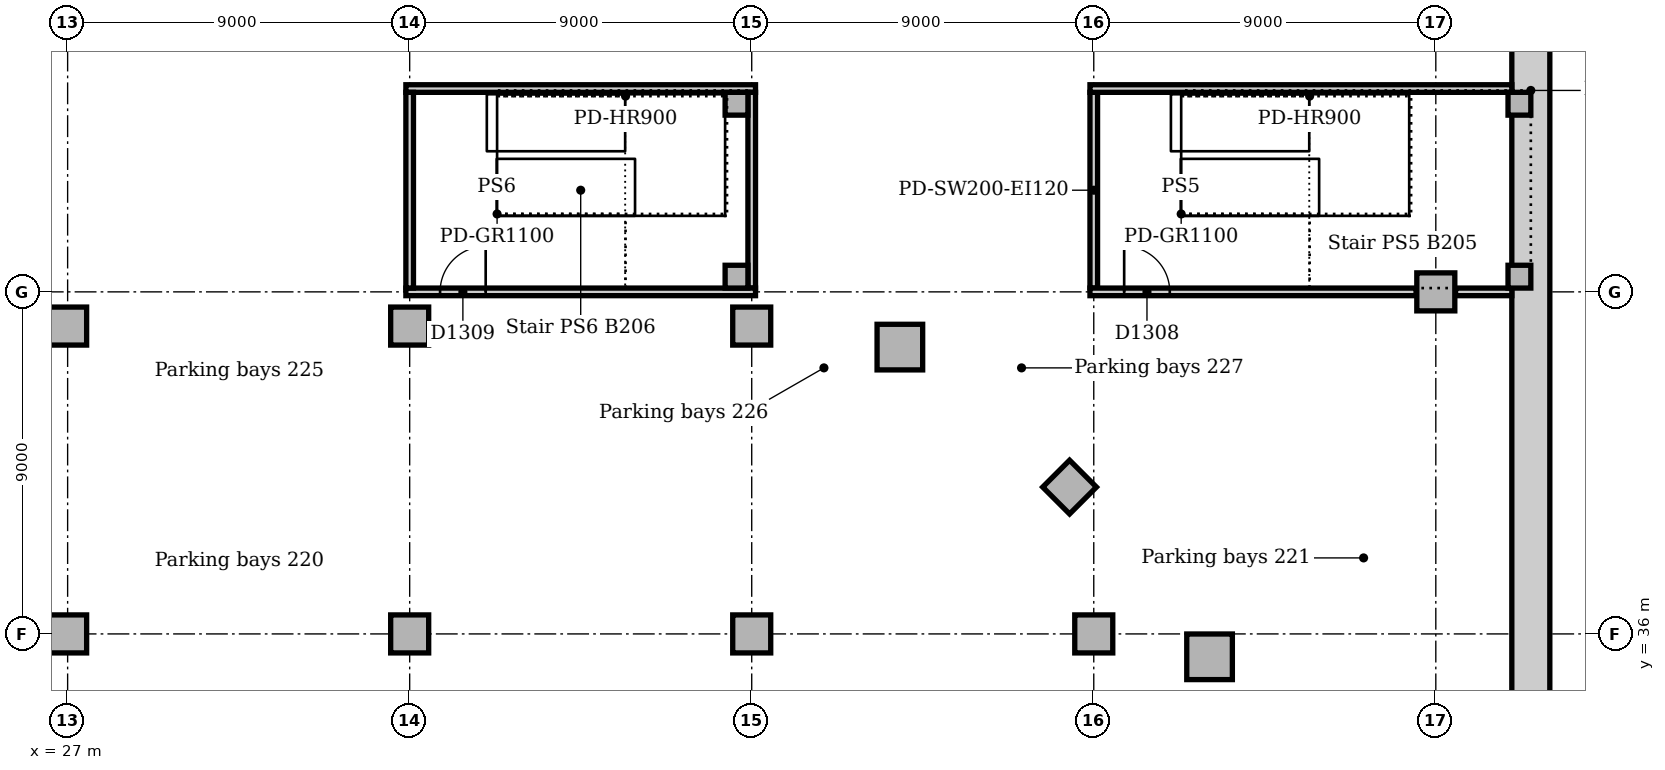
"""IFC4 building model, lengths in metres.
Left out: names, types, materials, properties, quantities, classifications, styles, units other than length and angle.
Written with IfcOpenShell. Run it as: python <this file> out.ifc"""

import sys

from ifc_helpers import new_model, si_unit, direction, frame, frame_2d, origin, origin_2d, place, context, subcontext, project, spatial, rectangle, extrude, element, fill, save


model = new_model("IFC4")
c1 = context("Model", 3, precision=1e-05, world=origin(), true_north=direction((0.0, 1.0)))
c2 = subcontext(c1, "Body", "Model", "MODEL_VIEW")
j1 = project(units=[si_unit("LENGTHUNIT", "METRE"), si_unit("PLANEANGLEUNIT", "RADIAN")], contexts=[c1])
p1 = place(None, origin())
s1 = spatial("IfcSite", under=j1, at=p1, CompositionType="ELEMENT")
p2 = place(p1, origin())
s2 = spatial("IfcBuilding", under=s1, at=p2, CompositionType="ELEMENT")
p3 = place(p2, frame((0.0, 0.0, -9.5)))
s3 = spatial("IfcBuildingStorey", under=s2, at=p3, CompositionType="ELEMENT", Elevation=-9.5)
for number, where, z_axis, x_axis in (
    (1, (57.047, 35.398, 0.0), (0.0, 0.0, 1.0), (1.0, 0.0, 0.0)),
    (2, (48.898, 43.547, 0.0), (0.0, 0.0, 1.0), (1.0, 0.0, 0.0)),
):
    element("IfcColumn", number, at=place(p3, frame(where, z_axis=z_axis, x_axis=x_axis)), inside=s3, PredefinedType="COLUMN", context=c2, shape_type="SweptSolid", body=[
        extrude(rectangle(XDim=1.2, YDim=1.2, at=origin_2d()), origin(), (0.0, 0.0, 1.0), 4.15),
    ])
for number, where, z_axis, x_axis in (
    (3, (53.364, 39.864, 0.0), (0.0, 0.0, 1.0), (0.707, 0.707, 0.0)),
    (4, (27.0, 44.1, 0.0), (0.0, 0.0, 1.0), (1.0, 0.0, 0.0)),
    (5, (36.0, 44.1, 0.0), (0.0, 0.0, 1.0), (1.0, 0.0, 0.0)),
    (6, (45.0, 44.1, 0.0), (0.0, 0.0, 1.0), (1.0, 0.0, 0.0)),
    (7, (27.0, 36.0, 0.0), (0.0, 0.0, 1.0), (1.0, 0.0, 0.0)),
    (8, (36.0, 36.0, 0.0), (0.0, 0.0, 1.0), (1.0, 0.0, 0.0)),
    (9, (45.0, 36.0, 0.0), (0.0, 0.0, 1.0), (1.0, 0.0, 0.0)),
    (10, (54.0, 36.0, 0.0), (0.0, 0.0, 1.0), (1.0, 0.0, 0.0)),
):
    element("IfcColumn", number, at=place(p3, frame(where, z_axis=z_axis, x_axis=x_axis)), inside=s3, PredefinedType="COLUMN", context=c2, shape_type="SweptSolid", body=[
        extrude(rectangle(XDim=1.0, YDim=1.0, at=origin_2d()), origin(), (0.0, 0.0, 1.0), 4.15),
    ])
p4 = place(p3, frame((65.5, 53.641, 0.0), z_axis=(0.0, 0.0, 1.0), x_axis=(0.0, -1.0, 0.0)))
e11 = element("IfcWall", 11, at=p4, inside=s3, PredefinedType="SOLIDWALL", context=c2, shape_type="SweptSolid", body=[
    extrude(rectangle(XDim=62.282, YDim=1.0, at=frame_2d((31.141, 0.0))), origin(), (0.0, 0.0, 1.0), 4.5),
])
p5 = place(p3, frame((63.0, 45.0, 0.0), z_axis=(0.0, 0.0, 1.0), x_axis=(1.0, 0.0, 0.0)))
e12 = element("IfcColumn", 12, at=p5, inside=s3, PredefinedType="COLUMN", context=c2, shape_type="SweptSolid", body=[
    extrude(rectangle(XDim=1.0, YDim=1.0, at=origin_2d()), origin(), (0.0, 0.0, 1.0), 4.15),
])
for number, where, z_axis, x_axis in (
    (13, (65.2, 49.95, 0.0), (0.0, 0.0, 1.0), (1.0, 0.0, 0.0)),
    (14, (65.2, 45.4, 0.0), (0.0, 0.0, 1.0), (1.0, 0.0, 0.0)),
    (15, (44.6, 49.95, 0.0), (0.0, 0.0, 1.0), (1.0, 0.0, 0.0)),
    (16, (44.6, 45.4, 0.0), (0.0, 0.0, 1.0), (1.0, 0.0, 0.0)),
):
    element("IfcColumn", number, at=place(p3, frame(where, z_axis=z_axis, x_axis=x_axis)), inside=s3, PredefinedType="COLUMN", context=c2, shape_type="SweptSolid", body=[
        extrude(rectangle(XDim=0.6, YDim=0.6, at=origin_2d()), origin(), (0.0, 0.0, 1.0), 4.5),
    ])
p6 = place(p3, frame((54.0, 45.1, 0.0), z_axis=(0.0, 0.0, 1.0), x_axis=(0.0, 1.0, 0.0)))
e17 = element("IfcWall", 17, at=p6, inside=s3, PredefinedType="SOLIDWALL", context=c2, shape_type="SweptSolid", body=[
    extrude(rectangle(XDim=5.15, YDim=0.2, at=frame_2d((2.575, 0.0))), origin(), (0.0, 0.0, 1.0), 4.15),
])
p7 = place(p3, frame((53.9, 50.35, 0.0), z_axis=(0.0, 0.0, 1.0), x_axis=(1.0, 0.0, 0.0)))
e18 = element("IfcWall", 18, at=p7, inside=s3, PredefinedType="SOLIDWALL", context=c2, shape_type="SweptSolid", body=[
    extrude(rectangle(XDim=11.1, YDim=0.2, at=frame_2d((5.55, 0.0))), origin(), (0.0, 0.0, 1.0), 4.15),
])
p8 = place(p3, frame((53.9, 45.0, 0.0), z_axis=(0.0, 0.0, 1.0), x_axis=(1.0, 0.0, 0.0)))
e19 = element("IfcWall", 19, at=p8, inside=s3, PredefinedType="SOLIDWALL", context=c2, shape_type="SweptSolid", body=[
    extrude(rectangle(XDim=8.58, YDim=0.2, at=frame_2d((4.29, 0.0))), origin(), (0.0, 0.0, 1.0), 4.15),
])
p9 = place(p8, frame((0.9, 0.0, 0.0)))
e20 = element("IfcOpeningElement", 20, at=p9, cuts=e19, PredefinedType="OPENING", context=c2, shape_type="SweptSolid", body=[
    extrude(rectangle(XDim=1.2, YDim=2.1, at=frame_2d((0.6, 1.05))), frame((0.0, 0.11, 0.0), z_axis=(0.0, -1.0, 0.0), x_axis=(1.0, 0.0, 0.0)), (0.0, 0.0, 1.0), 0.22),
])
p10 = place(p3, frame((63.52, 45.0, 0.0), z_axis=(0.0, 0.0, 1.0), x_axis=(1.0, 0.0, 0.0)))
e21 = element("IfcWall", 21, at=p10, inside=s3, PredefinedType="SOLIDWALL", context=c2, shape_type="SweptSolid", body=[
    extrude(rectangle(XDim=1.48, YDim=0.2, at=frame_2d((0.74, 0.0))), origin(), (0.0, 0.0, 1.0), 4.15),
])
p11 = place(p3, frame((35.9, 50.35, 0.0), z_axis=(0.0, 0.0, 1.0), x_axis=(1.0, 0.0, 0.0)))
e22 = element("IfcWall", 22, at=p11, inside=s3, PredefinedType="SOLIDWALL", context=c2, shape_type="SweptSolid", body=[
    extrude(rectangle(XDim=9.2, YDim=0.2, at=frame_2d((4.6, 0.0))), origin(), (0.0, 0.0, 1.0), 4.15),
])
p12 = place(p3, frame((45.0, 45.1, 0.0), z_axis=(0.0, 0.0, 1.0), x_axis=(0.0, 1.0, 0.0)))
e23 = element("IfcWall", 23, at=p12, inside=s3, PredefinedType="SOLIDWALL", context=c2, shape_type="SweptSolid", body=[
    extrude(rectangle(XDim=5.15, YDim=0.2, at=frame_2d((2.575, 0.0))), origin(), (0.0, 0.0, 1.0), 4.15),
])
p13 = place(p3, frame((35.9, 45.0, 0.0), z_axis=(0.0, 0.0, 1.0), x_axis=(1.0, 0.0, 0.0)))
e24 = element("IfcWall", 24, at=p13, inside=s3, PredefinedType="SOLIDWALL", context=c2, shape_type="SweptSolid", body=[
    extrude(rectangle(XDim=9.2, YDim=0.2, at=frame_2d((4.6, 0.0))), origin(), (0.0, 0.0, 1.0), 4.15),
])
p14 = place(p13, frame((0.9, 0.0, 0.0)))
e25 = element("IfcOpeningElement", 25, at=p14, cuts=e24, PredefinedType="OPENING", context=c2, shape_type="SweptSolid", body=[
    extrude(rectangle(XDim=1.2, YDim=2.1, at=frame_2d((0.6, 1.05))), frame((0.0, 0.11, 0.0), z_axis=(0.0, -1.0, 0.0), x_axis=(1.0, 0.0, 0.0)), (0.0, 0.0, 1.0), 0.22),
])
p15 = place(p3, frame((36.0, 45.1, 0.0), z_axis=(0.0, 0.0, 1.0), x_axis=(0.0, 1.0, 0.0)))
e26 = element("IfcWall", 26, at=p15, inside=s3, PredefinedType="SOLIDWALL", context=c2, shape_type="SweptSolid", body=[
    extrude(rectangle(XDim=5.15, YDim=0.2, at=frame_2d((2.575, 0.0))), origin(), (0.0, 0.0, 1.0), 4.15),
])
p16 = place(p9, origin())
e27 = element("IfcDoor", 27, at=p16, inside=s3, OperationType="SINGLE_SWING_LEFT", PredefinedType="DOOR", context=c2, shape_type="SweptSolid", body=[
    extrude(rectangle(XDim=1.2, YDim=2.1, at=frame_2d((0.6, 1.05))), frame((0.0, 0.025, 0.0), z_axis=(0.0, -1.0, 0.0), x_axis=(1.0, 0.0, 0.0)), (0.0, 0.0, 1.0), 0.05),
])
fill(e20, e27)
p17 = place(p14, origin())
e28 = element("IfcDoor", 28, at=p17, inside=s3, OperationType="SINGLE_SWING_RIGHT", PredefinedType="DOOR", context=c2, shape_type="SweptSolid", body=[
    extrude(rectangle(XDim=1.2, YDim=2.1, at=frame_2d((0.6, 1.05))), frame((0.0, 0.025, 0.0), z_axis=(0.0, -1.0, 0.0), x_axis=(1.0, 0.0, 0.0)), (0.0, 0.0, 1.0), 0.05),
])
fill(e25, e28)
save(model, sys.argv[1])
